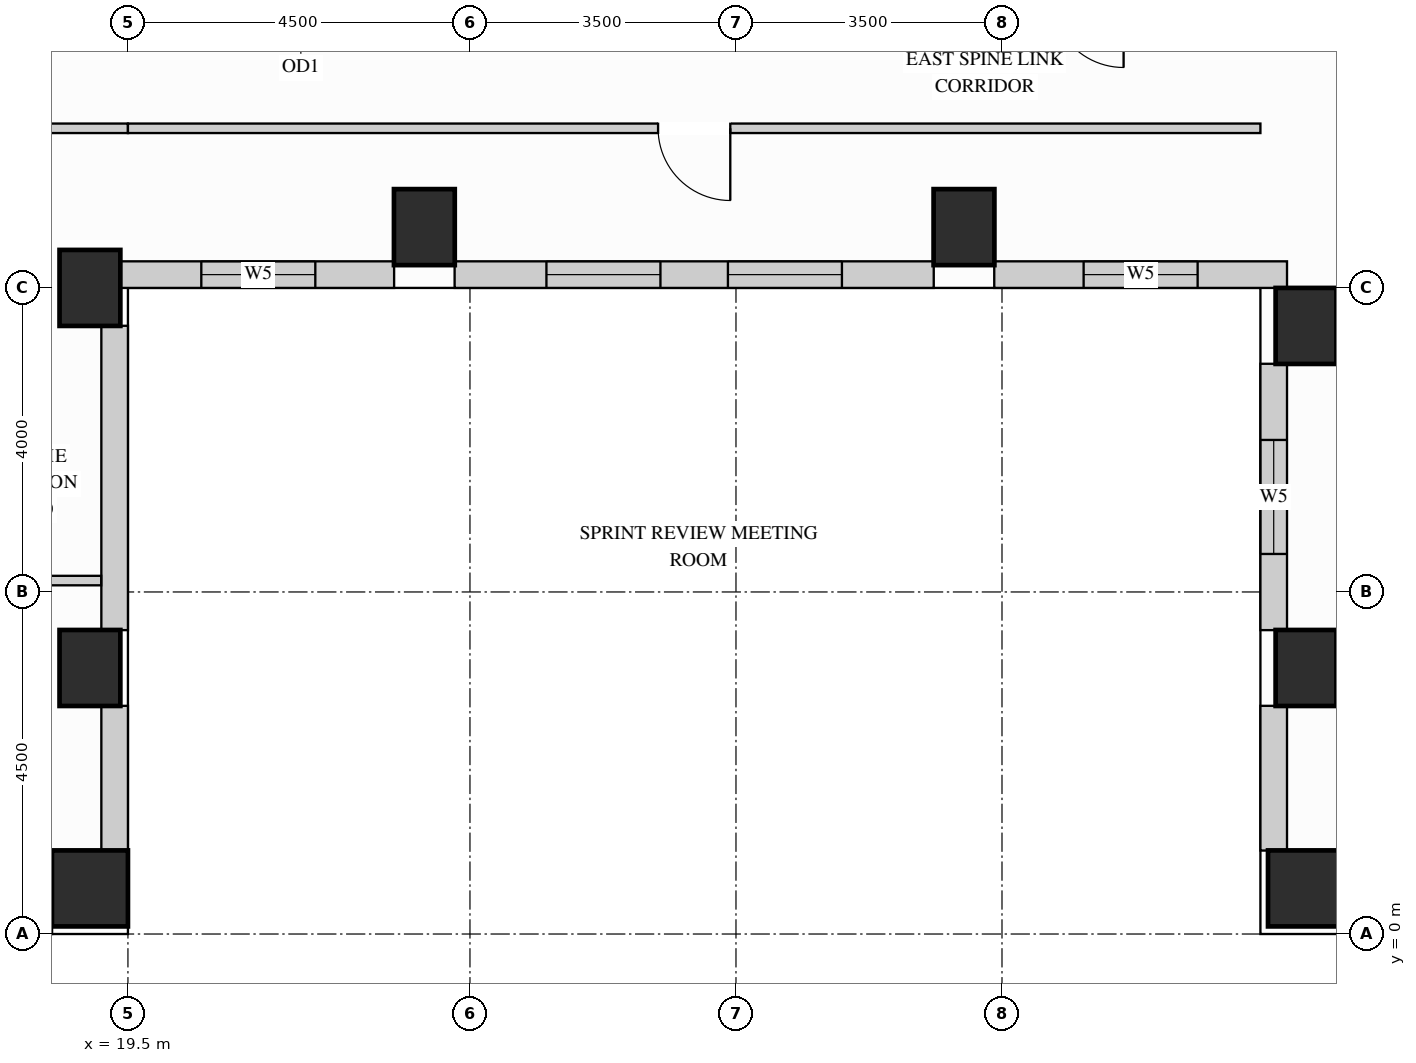
"""IFC4 building model, lengths in metres.
Left out: names, types, materials, properties, quantities, classifications, styles, units other than length and angle.
Written with IfcOpenShell. Run it as: python <this file> out.ifc"""

import sys

from ifc_helpers import new_model, si_unit, direction, frame, frame_2d, origin, origin_2d, place, context, subcontext, project, spatial, rectangle, extrude, source, transform, mapped, element, fill, save


model = new_model("IFC4")
c1 = context("Model", 3, precision=1e-05, world=origin(), true_north=direction((0.0, 1.0)))
c2 = subcontext(c1, "Body", "Model", "MODEL_VIEW")
j1 = project(units=[si_unit("LENGTHUNIT", "METRE"), si_unit("PLANEANGLEUNIT", "RADIAN")], contexts=[c1])
p1 = place(None, origin())
s1 = spatial("IfcSite", under=j1, at=p1, CompositionType="ELEMENT")
p2 = place(p1, origin())
s2 = spatial("IfcBuilding", under=s1, at=p2, CompositionType="ELEMENT")
p3 = place(p2, frame((0.0, 0.0, 168.3)))
s3 = spatial("IfcBuildingStorey", under=s2, at=p3, CompositionType="ELEMENT", Elevation=168.3)
m1 = source(origin(), c2, "Body", "SweptSolid", [
    extrude(rectangle(XDim=0.8, YDim=1.0, at=origin_2d()), origin(), (0.0, 0.0, 1.0), 3.4),
])
for number, where, z_axis, x_axis in (
    (1, (19.0, 3.5, 0.0), (0.0, 0.0, 1.0), (1.0, 0.0, 0.0)),
    (2, (19.0, 8.5, 0.0), (0.0, 0.0, 1.0), (1.0, 0.0, 0.0)),
    (3, (35.0, 3.5, 0.0), (0.0, 0.0, 1.0), (1.0, 0.0, 0.0)),
    (4, (35.0, 8.0, 0.0), (0.0, 0.0, 1.0), (1.0, 0.0, 0.0)),
    (5, (23.4, 9.3, 0.0), (0.0, 0.0, 1.0), (1.0, 0.0, 0.0)),
    (6, (30.5, 9.3, 0.0), (0.0, 0.0, 1.0), (1.0, 0.0, 0.0)),
):
    element("IfcColumn", number, at=place(p3, frame(where, z_axis=z_axis, x_axis=x_axis)), inside=s3, PredefinedType="COLUMN", context=c2, shape_type="MappedRepresentation", body=[
        mapped(m1, transform((0.0, 0.0, 0.0), x_axis=(1.0, 0.0, 0.0), y_axis=(0.0, 1.0, 0.0), z_axis=(0.0, 0.0, 1.0))),
    ])
m2 = source(origin(), c2, "Body", "SweptSolid", [
    extrude(rectangle(XDim=1.0, YDim=1.0, at=origin_2d()), origin(), (0.0, 0.0, 1.0), 3.4),
])
for number, where, z_axis, x_axis in (
    (7, (19.0, 0.6, 0.0), (0.0, 0.0, 1.0), (1.0, 0.0, 0.0)),
    (8, (35.0, 0.6, 0.0), (0.0, 0.0, 1.0), (1.0, 0.0, 0.0)),
):
    element("IfcColumn", number, at=place(p3, frame(where, z_axis=z_axis, x_axis=x_axis)), inside=s3, PredefinedType="COLUMN", context=c2, shape_type="MappedRepresentation", body=[
        mapped(m2, transform((0.0, 0.0, 0.0), x_axis=(1.0, 0.0, 0.0), y_axis=(0.0, 1.0, 0.0), z_axis=(0.0, 0.0, 1.0))),
    ])
p4 = place(p3, frame((14.998, 0.175, 0.0), z_axis=(0.0, 0.0, 1.0), x_axis=(1.0, 0.0, 0.0)))
e9 = element("IfcWall", 9, at=p4, inside=s3, PredefinedType="SOLIDWALL", context=c2, shape_type="SweptSolid", body=[
    extrude(rectangle(XDim=3.504, YDim=0.35, at=frame_2d((1.752, 0.0))), origin(), (0.0, 0.0, 1.0), 2.612),
])
p5 = place(p4, frame((0.552, 0.0, 0.78)))
e10 = element("IfcOpeningElement", 10, at=p5, cuts=e9, PredefinedType="OPENING", context=c2, shape_type="SweptSolid", body=[
    extrude(rectangle(XDim=2.4, YDim=1.652, at=frame_2d((1.2, 0.826))), frame((0.0, 0.185, 0.0), z_axis=(0.0, -1.0, 0.0), x_axis=(1.0, 0.0, 0.0)), (0.0, 0.0, 1.0), 0.37),
])
m3 = source(origin(), c2, "Body", "SweptSolid", [
    extrude(rectangle(XDim=1.904, YDim=0.35, at=frame_2d((0.952, 0.0))), origin(), (0.0, 0.0, 1.0), 2.612),
])
p6 = place(p3, frame((19.325, 1.098, 0.0), z_axis=(0.0, 0.0, 1.0), x_axis=(0.0, 1.0, 0.0)))
e11 = element("IfcWall", 11, at=p6, inside=s3, PredefinedType="SOLIDWALL", context=c2, shape_type="MappedRepresentation", body=[
    mapped(m3, transform((0.0, 0.0, 0.0), x_axis=(1.0, 0.0, 0.0), y_axis=(0.0, 1.0, 0.0), z_axis=(0.0, 0.0, 1.0))),
])
m4 = source(origin(), c2, "Body", "SweptSolid", [
    extrude(rectangle(XDim=4.004, YDim=0.35, at=frame_2d((2.002, 0.0))), origin(), (0.0, 0.0, 1.0), 2.612),
])
p7 = place(p3, frame((19.325, 3.998, 0.0), z_axis=(0.0, 0.0, 1.0), x_axis=(0.0, 1.0, 0.0)))
e12 = element("IfcWall", 12, at=p7, inside=s3, PredefinedType="SOLIDWALL", context=c2, shape_type="MappedRepresentation", body=[
    mapped(m4, transform((0.0, 0.0, 0.0), x_axis=(1.0, 0.0, 0.0), y_axis=(0.0, 1.0, 0.0), z_axis=(0.0, 0.0, 1.0))),
])
p8 = place(p3, frame((19.398, 8.675, 0.0), z_axis=(0.0, 0.0, 1.0), x_axis=(1.0, 0.0, 0.0)))
e13 = element("IfcWall", 13, at=p8, inside=s3, PredefinedType="SOLIDWALL", context=c2, shape_type="SweptSolid", body=[
    extrude(rectangle(XDim=3.604, YDim=0.35, at=frame_2d((1.802, 0.0))), origin(), (0.0, 0.0, 1.0), 3.385),
])
p9 = place(p8, frame((1.067, 0.0, 0.78)))
e14 = element("IfcOpeningElement", 14, at=p9, cuts=e13, PredefinedType="OPENING", context=c2, shape_type="SweptSolid", body=[
    extrude(rectangle(XDim=1.5, YDim=2.0, at=frame_2d((0.75, 1.0))), frame((0.0, 0.185, 0.0), z_axis=(0.0, -1.0, 0.0), x_axis=(1.0, 0.0, 0.0)), (0.0, 0.0, 1.0), 0.37),
])
p10 = place(p3, frame((23.798, 8.675, 0.0), z_axis=(0.0, 0.0, 1.0), x_axis=(1.0, 0.0, 0.0)))
e15 = element("IfcWall", 15, at=p10, inside=s3, PredefinedType="SOLIDWALL", context=c2, shape_type="SweptSolid", body=[
    extrude(rectangle(XDim=6.304, YDim=0.35, at=frame_2d((3.152, 0.0))), origin(), (0.0, 0.0, 1.0), 3.385),
])
p11 = place(p10, frame((1.208, 0.0, 0.78)))
e16 = element("IfcOpeningElement", 16, at=p11, cuts=e15, PredefinedType="OPENING", context=c2, shape_type="SweptSolid", body=[
    extrude(rectangle(XDim=1.5, YDim=2.0, at=frame_2d((0.75, 1.0))), frame((0.0, 0.185, 0.0), z_axis=(0.0, -1.0, 0.0), x_axis=(1.0, 0.0, 0.0)), (0.0, 0.0, 1.0), 0.37),
])
p12 = place(p10, frame((3.596, 0.0, 0.78)))
e17 = element("IfcOpeningElement", 17, at=p12, cuts=e15, PredefinedType="OPENING", context=c2, shape_type="SweptSolid", body=[
    extrude(rectangle(XDim=1.5, YDim=2.0, at=frame_2d((0.75, 1.0))), frame((0.0, 0.185, 0.0), z_axis=(0.0, -1.0, 0.0), x_axis=(1.0, 0.0, 0.0)), (0.0, 0.0, 1.0), 0.37),
])
p13 = place(p3, frame((30.898, 8.675, 0.0), z_axis=(0.0, 0.0, 1.0), x_axis=(1.0, 0.0, 0.0)))
e18 = element("IfcWall", 18, at=p13, inside=s3, PredefinedType="SOLIDWALL", context=c2, shape_type="SweptSolid", body=[
    extrude(rectangle(XDim=3.852, YDim=0.35, at=frame_2d((1.926, 0.0))), origin(), (0.0, 0.0, 1.0), 3.385),
])
p14 = place(p13, frame((1.176, 0.0, 0.78)))
e19 = element("IfcOpeningElement", 19, at=p14, cuts=e18, PredefinedType="OPENING", context=c2, shape_type="SweptSolid", body=[
    extrude(rectangle(XDim=1.5, YDim=2.0, at=frame_2d((0.75, 1.0))), frame((0.0, 0.185, 0.0), z_axis=(0.0, -1.0, 0.0), x_axis=(1.0, 0.0, 0.0)), (0.0, 0.0, 1.0), 0.37),
])
p15 = place(p3, frame((34.575, 7.502, 0.0), z_axis=(0.0, 0.0, 1.0), x_axis=(0.0, -1.0, 0.0)))
e20 = element("IfcWall", 20, at=p15, inside=s3, PredefinedType="SOLIDWALL", context=c2, shape_type="SweptSolid", body=[
    extrude(rectangle(XDim=3.504, YDim=0.35, at=frame_2d((1.752, 0.0))), origin(), (0.0, 0.0, 1.0), 2.612),
])
p16 = place(p15, frame((1.002, 0.0, 0.78)))
e21 = element("IfcOpeningElement", 21, at=p16, cuts=e20, PredefinedType="OPENING", context=c2, shape_type="SweptSolid", body=[
    extrude(rectangle(XDim=1.5, YDim=1.652, at=frame_2d((0.75, 0.826))), frame((0.0, 0.185, 0.0), z_axis=(0.0, -1.0, 0.0), x_axis=(1.0, 0.0, 0.0)), (0.0, 0.0, 1.0), 0.37),
])
p17 = place(p3, frame((34.575, 3.002, 0.0), z_axis=(0.0, 0.0, 1.0), x_axis=(0.0, -1.0, 0.0)))
e22 = element("IfcWall", 22, at=p17, inside=s3, PredefinedType="SOLIDWALL", context=c2, shape_type="MappedRepresentation", body=[
    mapped(m3, transform((0.0, 0.0, 0.0), x_axis=(1.0, 0.0, 0.0), y_axis=(0.0, 1.0, 0.0), z_axis=(0.0, 0.0, 1.0))),
])
m5 = source(origin(), c2, "Body", "SweptSolid", [
    extrude(rectangle(XDim=2.45, YDim=0.125, at=frame_2d((1.225, 0.0))), origin(), (0.0, 0.0, 1.0), 3.385),
])
p18 = place(p3, frame((17.05, 10.6, 0.0), z_axis=(0.0, 0.0, 1.0), x_axis=(1.0, 0.0, 0.0)))
e23 = element("IfcWall", 23, at=p18, inside=s3, PredefinedType="PARTITIONING", context=c2, shape_type="MappedRepresentation", body=[
    mapped(m5, transform((0.0, 0.0, 0.0), x_axis=(1.0, 0.0, 0.0), y_axis=(0.0, 1.0, 0.0), z_axis=(0.0, 0.0, 1.0))),
])
p19 = place(p3, frame((19.5, 10.6, 0.0), z_axis=(0.0, 0.0, 1.0), x_axis=(1.0, 0.0, 0.0)))
e24 = element("IfcWall", 24, at=p19, inside=s3, PredefinedType="PARTITIONING", context=c2, shape_type="SweptSolid", body=[
    extrude(rectangle(XDim=14.9, YDim=0.125, at=frame_2d((7.45, 0.0))), origin(), (0.0, 0.0, 1.0), 3.385),
])
p20 = place(p19, frame((6.975, 0.0, 0.0)))
e25 = element("IfcOpeningElement", 25, at=p20, cuts=e24, PredefinedType="OPENING", context=c2, shape_type="SweptSolid", body=[
    extrude(rectangle(XDim=0.95, YDim=2.15, at=frame_2d((0.475, 1.075))), frame((0.0, 0.073, 0.0), z_axis=(0.0, -1.0, 0.0), x_axis=(1.0, 0.0, 0.0)), (0.0, 0.0, 1.0), 0.145),
])
m6 = source(origin(), c2, "Body", "SweptSolid", [
    extrude(rectangle(XDim=2.098, YDim=0.125, at=frame_2d((1.049, 0.0))), origin(), (0.0, 0.0, 1.0), 2.848),
])
p21 = place(p3, frame((17.05, 4.65, 0.0), z_axis=(0.0, 0.0, 1.0), x_axis=(1.0, 0.0, 0.0)))
e26 = element("IfcWall", 26, at=p21, inside=s3, PredefinedType="PARTITIONING", context=c2, shape_type="MappedRepresentation", body=[
    mapped(m6, transform((0.0, 0.0, 0.0), x_axis=(1.0, 0.0, 0.0), y_axis=(0.0, 1.0, 0.0), z_axis=(0.0, 0.0, 1.0))),
])
m7 = source(origin(), c2, "Body", "SweptSolid", [
    extrude(rectangle(XDim=0.95, YDim=2.15, at=frame_2d((0.475, 1.075))), frame((0.0, 0.025, 0.0), z_axis=(0.0, -1.0, 0.0), x_axis=(1.0, 0.0, 0.0)), (0.0, 0.0, 1.0), 0.05),
])
p22 = place(p20, origin())
e27 = element("IfcDoor", 27, at=p22, inside=s3, OperationType="SINGLE_SWING_RIGHT", PredefinedType="DOOR", context=c2, shape_type="MappedRepresentation", body=[
    mapped(m7, transform((0.0, 0.0, 0.0), x_axis=(1.0, 0.0, 0.0), y_axis=(0.0, 1.0, 0.0), z_axis=(0.0, 0.0, 1.0))),
])
fill(e25, e27)
m8 = source(origin(), c2, "Body", "SweptSolid", [
    extrude(rectangle(XDim=1.5, YDim=2.0, at=frame_2d((0.75, 1.0))), frame((0.0, 0.03, 0.0), z_axis=(0.0, -1.0, 0.0), x_axis=(1.0, 0.0, 0.0)), (0.0, 0.0, 1.0), 0.06),
])
p23 = place(p9, origin())
e28 = element("IfcWindow", 28, at=p23, inside=s3, PartitioningType="SINGLE_PANEL", PredefinedType="WINDOW", context=c2, shape_type="MappedRepresentation", body=[
    mapped(m8, transform((0.0, 0.0, 0.0), x_axis=(1.0, 0.0, 0.0), y_axis=(0.0, 1.0, 0.0), z_axis=(0.0, 0.0, 1.0))),
])
fill(e14, e28)
p24 = place(p11, origin())
e29 = element("IfcWindow", 29, at=p24, inside=s3, PartitioningType="SINGLE_PANEL", PredefinedType="WINDOW", context=c2, shape_type="MappedRepresentation", body=[
    mapped(m8, transform((0.0, 0.0, 0.0), x_axis=(1.0, 0.0, 0.0), y_axis=(0.0, 1.0, 0.0), z_axis=(0.0, 0.0, 1.0))),
])
fill(e16, e29)
p25 = place(p12, origin())
e30 = element("IfcWindow", 30, at=p25, inside=s3, PartitioningType="SINGLE_PANEL", PredefinedType="WINDOW", context=c2, shape_type="MappedRepresentation", body=[
    mapped(m8, transform((0.0, 0.0, 0.0), x_axis=(1.0, 0.0, 0.0), y_axis=(0.0, 1.0, 0.0), z_axis=(0.0, 0.0, 1.0))),
])
fill(e17, e30)
p26 = place(p14, origin())
e31 = element("IfcWindow", 31, at=p26, inside=s3, PartitioningType="SINGLE_PANEL", PredefinedType="WINDOW", context=c2, shape_type="MappedRepresentation", body=[
    mapped(m8, transform((0.0, 0.0, 0.0), x_axis=(1.0, 0.0, 0.0), y_axis=(0.0, 1.0, 0.0), z_axis=(0.0, 0.0, 1.0))),
])
fill(e19, e31)
m9 = source(origin(), c2, "Body", "SweptSolid", [
    extrude(rectangle(XDim=1.5, YDim=1.652, at=frame_2d((0.75, 0.826))), frame((0.0, 0.03, 0.0), z_axis=(0.0, -1.0, 0.0), x_axis=(1.0, 0.0, 0.0)), (0.0, 0.0, 1.0), 0.06),
])
p27 = place(p16, origin())
e32 = element("IfcWindow", 32, at=p27, inside=s3, PartitioningType="SINGLE_PANEL", PredefinedType="WINDOW", context=c2, shape_type="MappedRepresentation", body=[
    mapped(m9, transform((0.0, 0.0, 0.0), x_axis=(1.0, 0.0, 0.0), y_axis=(0.0, 1.0, 0.0), z_axis=(0.0, 0.0, 1.0))),
])
fill(e21, e32)
save(model, sys.argv[1])
